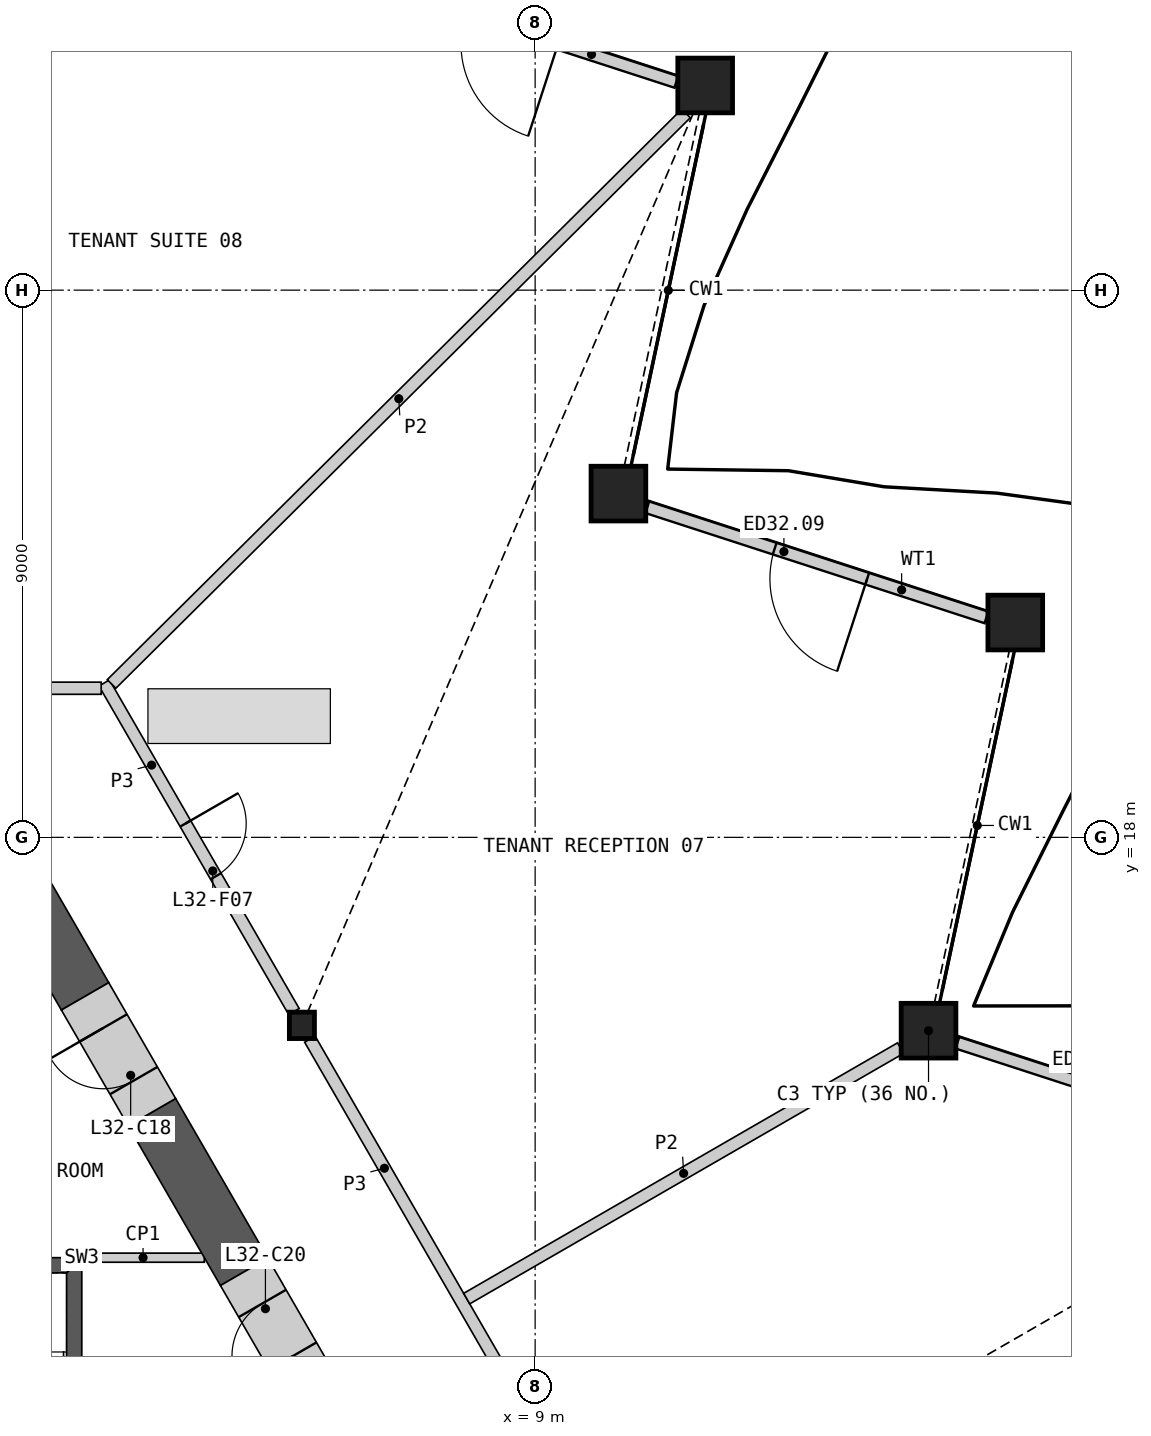
"""IFC4 building model, lengths in metres.
Left out: names, types, materials, properties, quantities, classifications, styles, units other than length and angle.
Written with IfcOpenShell. Run it as: python <this file> out.ifc"""

import sys

from ifc_helpers import new_model, si_unit, direction, frame, frame_2d, origin, origin_2d, place, context, subcontext, project, spatial, polyline, rectangle, hollow_rectangle, i_section, outline, extrude, element, fill, save


model = new_model("IFC4")
c1 = context("Model", 3, precision=1e-05, world=origin(), true_north=direction((0.0, 1.0)))
c2 = subcontext(c1, "Body", "Model", "MODEL_VIEW")
j1 = project(units=[si_unit("LENGTHUNIT", "METRE"), si_unit("PLANEANGLEUNIT", "RADIAN")], contexts=[c1])
p1 = place(None, origin())
s1 = spatial("IfcSite", under=j1, at=p1, CompositionType="ELEMENT")
p2 = place(p1, origin())
s2 = spatial("IfcBuilding", under=s1, at=p2, CompositionType="ELEMENT")
p3 = place(p2, frame((0.0, 0.0, 150.0)))
s3 = spatial("IfcBuildingStorey", under=s2, at=p3, CompositionType="ELEMENT", Elevation=150.0)
for number, where, z_axis, x_axis in (
    (1, (15.469, 14.82, 0.0), (0.0, 0.0, 1.0), (1.0, 0.0, 0.0)),
    (2, (16.896, 21.533, 0.0), (0.0, 0.0, 1.0), (1.0, 0.0, 0.0)),
    (3, (10.37, 23.654, 0.0), (0.0, 0.0, 1.0), (1.0, 0.0, 0.0)),
    (4, (11.796, 30.366, 0.0), (0.0, 0.0, 1.0), (1.0, 0.0, 0.0)),
):
    element("IfcColumn", number, at=place(p3, frame(where, z_axis=z_axis, x_axis=x_axis)), inside=s3, PredefinedType="COLUMN", context=c2, shape_type="SweptSolid", body=[
        extrude(hollow_rectangle(XDim=0.9, YDim=0.9, WallThickness=0.06, at=origin_2d()), origin(), (0.0, 0.0, 1.0), 4.2),
    ])
p4 = place(p3, frame((5.164, 14.908, 0.0), z_axis=(0.0, 0.0, 1.0), x_axis=(1.0, 0.0, 0.0)))
e5 = element("IfcColumn", 5, at=p4, inside=s3, PredefinedType="COLUMN", context=c2, shape_type="SweptSolid", body=[
    extrude(i_section(OverallWidth=0.412, OverallDepth=0.435, WebThickness=0.036, FlangeThickness=0.057, at=origin_2d()), origin(), (0.0, 0.0, 1.0), 4.2),
])
p5 = place(p3, frame((21.521, 12.81, 0.0), z_axis=(0.0, 0.0, 1.0), x_axis=(-0.951049976734, 0.309037120351, 0.0)))
e6 = element("IfcWall", 6, at=p5, inside=s3, PredefinedType="SOLIDWALL", context=c2, shape_type="SweptSolid", body=[
    extrude(rectangle(XDim=5.864, YDim=0.2, at=frame_2d((2.932, 0.0))), origin(), (0.0, 0.0, 1.0), 3.189),
])
p6 = place(p5, frame((2.081, 0.0, 0.0)))
e7 = element("IfcOpeningElement", 7, at=p6, cuts=e6, PredefinedType="OPENING", context=c2, shape_type="SweptSolid", body=[
    extrude(rectangle(XDim=1.6, YDim=2.4, at=frame_2d((0.8, 1.2))), frame((0.0, 0.11, 0.0), z_axis=(0.0, -1.0, 0.0), x_axis=(1.0, 0.0, 0.0)), (0.0, 0.0, 1.0), 0.22),
])
p7 = place(p3, frame((16.422, 21.617, 0.0), z_axis=(0.0, 0.0, 1.0), x_axis=(-0.951066187209, 0.308987228779, 0.0)))
e8 = element("IfcWall", 8, at=p7, inside=s3, PredefinedType="SOLIDWALL", context=c2, shape_type="SweptSolid", body=[
    extrude(rectangle(XDim=5.864, YDim=0.2, at=frame_2d((2.932, 0.0))), origin(), (0.0, 0.0, 1.0), 3.189),
])
p8 = place(p7, frame((2.062, 0.0, 0.0)))
e9 = element("IfcOpeningElement", 9, at=p8, cuts=e8, PredefinedType="OPENING", context=c2, shape_type="SweptSolid", body=[
    extrude(rectangle(XDim=1.6, YDim=2.4, at=frame_2d((0.8, 1.2))), frame((0.0, 0.11, 0.0), z_axis=(0.0, -1.0, 0.0), x_axis=(1.0, 0.0, 0.0)), (0.0, 0.0, 1.0), 0.22),
])
p9 = place(p3, frame((11.322, 30.424, 0.0), z_axis=(0.0, 0.0, 1.0), x_axis=(-0.951053952554, 0.309024884649, 0.0)))
e10 = element("IfcWall", 10, at=p9, inside=s3, PredefinedType="SOLIDWALL", context=c2, shape_type="SweptSolid", body=[
    extrude(rectangle(XDim=5.865, YDim=0.2, at=frame_2d((2.932, 0.0))), origin(), (0.0, 0.0, 1.0), 3.189),
])
p10 = place(p9, frame((2.042, 0.0, 0.0)))
e11 = element("IfcOpeningElement", 11, at=p10, cuts=e10, PredefinedType="OPENING", context=c2, shape_type="SweptSolid", body=[
    extrude(rectangle(XDim=1.6, YDim=2.4, at=frame_2d((0.8, 1.2))), frame((0.0, 0.11, 0.0), z_axis=(0.0, -1.0, 0.0), x_axis=(1.0, 0.0, 0.0)), (0.0, 0.0, 1.0), 0.22),
])
p11 = place(p3, origin())
e12 = element("IfcWall", 12, at=p11, inside=s3, PredefinedType="SHEAR", context=c2, shape_type="SweptSolid", body=[
    extrude(outline(polyline([(1.544, 5.237), (1.544, 11.087), (1.294, 10.837), (1.294, 5.237), (1.544, 5.237)])), origin(), (0.0, 0.0, 1.0), 3.8),
])
p12 = place(p3, origin())
e13 = element("IfcWall", 13, at=p12, inside=s3, PredefinedType="SHEAR", context=c2, shape_type="SweptSolid", body=[
    extrude(outline(polyline([(1.544, 11.087), (-1.544, 11.087), (-1.294, 10.837), (1.294, 10.837), (1.544, 11.087)])), origin(), (0.0, 0.0, 1.0), 3.8),
])
p13 = place(p3, frame((1.544, 11.087, 0.0), z_axis=(0.0, 0.0, 1.0), x_axis=(1.0, 0.0, 0.0)))
e14 = element("IfcWall", 14, at=p13, inside=s3, PredefinedType="PARTITIONING", context=c2, shape_type="SweptSolid", body=[
    extrude(rectangle(XDim=2.016, YDim=0.15, at=frame_2d((1.008, 0.0))), origin(), (0.0, 0.0, 1.0), 3.8),
])
p14 = place(p3, frame((4.214, 10.854, 0.0), z_axis=(0.0, 0.0, 1.0), x_axis=(-0.500001238203, 0.866024688907, 0.0)))
e15 = element("IfcWall", 15, at=p14, inside=s3, PredefinedType="SHEAR", context=c2, shape_type="SweptSolid", body=[
    extrude(rectangle(XDim=3.032, YDim=0.9, at=frame_2d((1.516, 0.0))), origin(), (0.0, 0.0, 1.0), 3.8),
])
p15 = place(p3, frame((1.598, 15.385, 0.0), z_axis=(0.0, 0.0, 1.0), x_axis=(-0.499996476014, 0.866027438349, 0.0)))
e16 = element("IfcWall", 16, at=p15, inside=s3, PredefinedType="SHEAR", context=c2, shape_type="SweptSolid", body=[
    extrude(rectangle(XDim=2.417, YDim=0.9, at=frame_2d((1.208, 0.0))), origin(), (0.0, 0.0, 1.0), 3.8),
])
p16 = place(p3, frame((2.698, 13.479, 0.0), z_axis=(0.0, 0.0, 1.0), x_axis=(-0.50002983664, 0.866008176907, 0.0)))
e17 = element("IfcWall", 17, at=p16, inside=s3, PredefinedType="SHEAR", context=c2, shape_type="SweptSolid", body=[
    extrude(rectangle(XDim=2.2, YDim=0.9, at=frame_2d((1.1, 0.0))), origin(), (0.0, 0.0, 1.0), 3.8),
])
p17 = place(p16, frame((0.6, 0.0, 0.0)))
e18 = element("IfcOpeningElement", 18, at=p17, cuts=e17, PredefinedType="OPENING", context=c2, shape_type="SweptSolid", body=[
    extrude(rectangle(XDim=1.0, YDim=2.1, at=frame_2d((0.5, 1.05))), frame((0.0, 0.46, 0.0), z_axis=(0.0, -1.0, 0.0), x_axis=(1.0, 0.0, 0.0)), (0.0, 0.0, 1.0), 0.92),
])
p18 = place(p3, frame((5.314, 8.948, 0.0), z_axis=(0.0, 0.0, 1.0), x_axis=(-0.500077893725, 0.86598042715, 0.0)))
e19 = element("IfcWall", 19, at=p18, inside=s3, PredefinedType="SHEAR", context=c2, shape_type="SweptSolid", body=[
    extrude(rectangle(XDim=2.2, YDim=0.9, at=frame_2d((1.1, 0.0))), origin(), (0.0, 0.0, 1.0), 3.8),
])
p19 = place(p18, frame((0.6, 0.0, 0.0)))
e20 = element("IfcOpeningElement", 20, at=p19, cuts=e19, PredefinedType="OPENING", context=c2, shape_type="SweptSolid", body=[
    extrude(rectangle(XDim=1.0, YDim=2.1, at=frame_2d((0.5, 1.05))), frame((0.0, 0.46, 0.0), z_axis=(0.0, -1.0, 0.0), x_axis=(1.0, 0.0, 0.0)), (0.0, 0.0, 1.0), 0.92),
])
p20 = place(p3, frame((5.295, 14.68, 0.0), z_axis=(0.0, 0.0, 1.0), x_axis=(0.500012035596, -0.866018454918, 0.0)))
e21 = element("IfcWall", 21, at=p20, inside=s3, PredefinedType="PARTITIONING", context=c2, shape_type="SweptSolid", body=[
    extrude(rectangle(XDim=9.803, YDim=0.2, at=frame_2d((4.902, 0.0))), origin(), (0.0, 0.0, 1.0), 3.8),
])
p21 = place(p20, frame((6.853, 0.0, 0.0)))
e22 = element("IfcOpeningElement", 22, at=p21, cuts=e21, PredefinedType="OPENING", context=c2, shape_type="SweptSolid", body=[
    extrude(rectangle(XDim=1.0, YDim=2.1, at=frame_2d((0.5, 1.05))), frame((0.0, 0.11, 0.0), z_axis=(0.0, -1.0, 0.0), x_axis=(1.0, 0.0, 0.0)), (0.0, 0.0, 1.0), 0.22),
])
p22 = place(p3, frame((1.913, 20.539, 0.0), z_axis=(0.0, 0.0, 1.0), x_axis=(0.499980978912, -0.866036385336, 0.0)))
e23 = element("IfcWall", 23, at=p22, inside=s3, PredefinedType="PARTITIONING", context=c2, shape_type="SweptSolid", body=[
    extrude(rectangle(XDim=6.24, YDim=0.2, at=frame_2d((3.12, 0.0))), origin(), (0.0, 0.0, 1.0), 3.8),
])
p23 = place(p22, frame((2.67, 0.0, 0.0)))
e24 = element("IfcOpeningElement", 24, at=p23, cuts=e23, PredefinedType="OPENING", context=c2, shape_type="SweptSolid", body=[
    extrude(rectangle(XDim=1.0, YDim=2.1, at=frame_2d((0.5, 1.05))), frame((0.0, 0.11, 0.0), z_axis=(0.0, -1.0, 0.0), x_axis=(1.0, 0.0, 0.0)), (0.0, 0.0, 1.0), 0.22),
])
p24 = place(p3, frame((-1.863, 20.453, 0.0), z_axis=(0.0, 0.0, 1.0), x_axis=(1.0, 0.0, 0.0)))
e25 = element("IfcWall", 25, at=p24, inside=s3, PredefinedType="PARTITIONING", context=c2, shape_type="SweptSolid", body=[
    extrude(rectangle(XDim=3.726, YDim=0.2, at=frame_2d((1.863, 0.0))), origin(), (0.0, 0.0, 1.0), 3.8),
])
p25 = place(p24, frame((1.363, 0.0, 0.0)))
e26 = element("IfcOpeningElement", 26, at=p25, cuts=e25, PredefinedType="OPENING", context=c2, shape_type="SweptSolid", body=[
    extrude(rectangle(XDim=1.0, YDim=2.1, at=frame_2d((0.5, 1.05))), frame((0.0, 0.11, 0.0), z_axis=(0.0, -1.0, 0.0), x_axis=(1.0, 0.0, 0.0)), (0.0, 0.0, 1.0), 0.22),
])
p26 = place(p3, frame((2.034, 20.523, 0.0), z_axis=(0.0, 0.0, 1.0), x_axis=(0.709504632293, 0.704700771076, 0.0)))
e27 = element("IfcWall", 27, at=p26, inside=s3, PredefinedType="PARTITIONING", context=c2, shape_type="SweptSolid", body=[
    extrude(rectangle(XDim=13.315, YDim=0.2, at=frame_2d((6.658, 0.0))), origin(), (0.0, 0.0, 1.0), 2.885),
])
p27 = place(p3, frame((7.875, 10.414, 0.0), z_axis=(0.0, 0.0, 1.0), x_axis=(0.866026194422, 0.499998630573, 0.0)))
e28 = element("IfcWall", 28, at=p27, inside=s3, PredefinedType="PARTITIONING", context=c2, shape_type="SweptSolid", body=[
    extrude(rectangle(XDim=8.239, YDim=0.2, at=frame_2d((4.119, 0.0))), origin(), (0.0, 0.0, 1.0), 2.885),
])
p28 = place(p8, origin())
e29 = element("IfcDoor", 29, at=p28, inside=s3, OperationType="DOUBLE_DOOR_SINGLE_SWING", PredefinedType="DOOR", context=c2, shape_type="SweptSolid", body=[
    extrude(rectangle(XDim=1.6, YDim=2.4, at=frame_2d((0.8, 1.2))), frame((0.0, 0.025, 0.0), z_axis=(0.0, -1.0, 0.0), x_axis=(1.0, 0.0, 0.0)), (0.0, 0.0, 1.0), 0.05),
])
fill(e9, e29)
p29 = place(p17, origin())
e30 = element("IfcDoor", 30, at=p29, inside=s3, OperationType="SINGLE_SWING_RIGHT", PredefinedType="DOOR", context=c2, shape_type="SweptSolid", body=[
    extrude(rectangle(XDim=1.0, YDim=2.1, at=frame_2d((0.5, 1.05))), frame((0.0, 0.205, 0.0), z_axis=(0.0, -1.0, 0.0), x_axis=(1.0, 0.0, 0.0)), (0.0, 0.0, 1.0), 0.05),
])
fill(e18, e30)
p30 = place(p19, origin())
e31 = element("IfcDoor", 31, at=p30, inside=s3, OperationType="SINGLE_SWING_LEFT", PredefinedType="DOOR", context=c2, shape_type="SweptSolid", body=[
    extrude(rectangle(XDim=1.0, YDim=2.1, at=frame_2d((0.5, 1.05))), frame((0.0, 0.205, 0.0), z_axis=(0.0, -1.0, 0.0), x_axis=(1.0, 0.0, 0.0)), (0.0, 0.0, 1.0), 0.05),
])
fill(e20, e31)
p31 = place(p23, origin())
e32 = element("IfcDoor", 32, at=p31, inside=s3, OperationType="SINGLE_SWING_LEFT", PredefinedType="DOOR", context=c2, shape_type="SweptSolid", body=[
    extrude(rectangle(XDim=1.0, YDim=2.1, at=frame_2d((0.5, 1.05))), frame((0.0, 0.025, 0.0), z_axis=(0.0, -1.0, 0.0), x_axis=(1.0, 0.0, 0.0)), (0.0, 0.0, 1.0), 0.05),
])
fill(e24, e32)
save(model, sys.argv[1])
